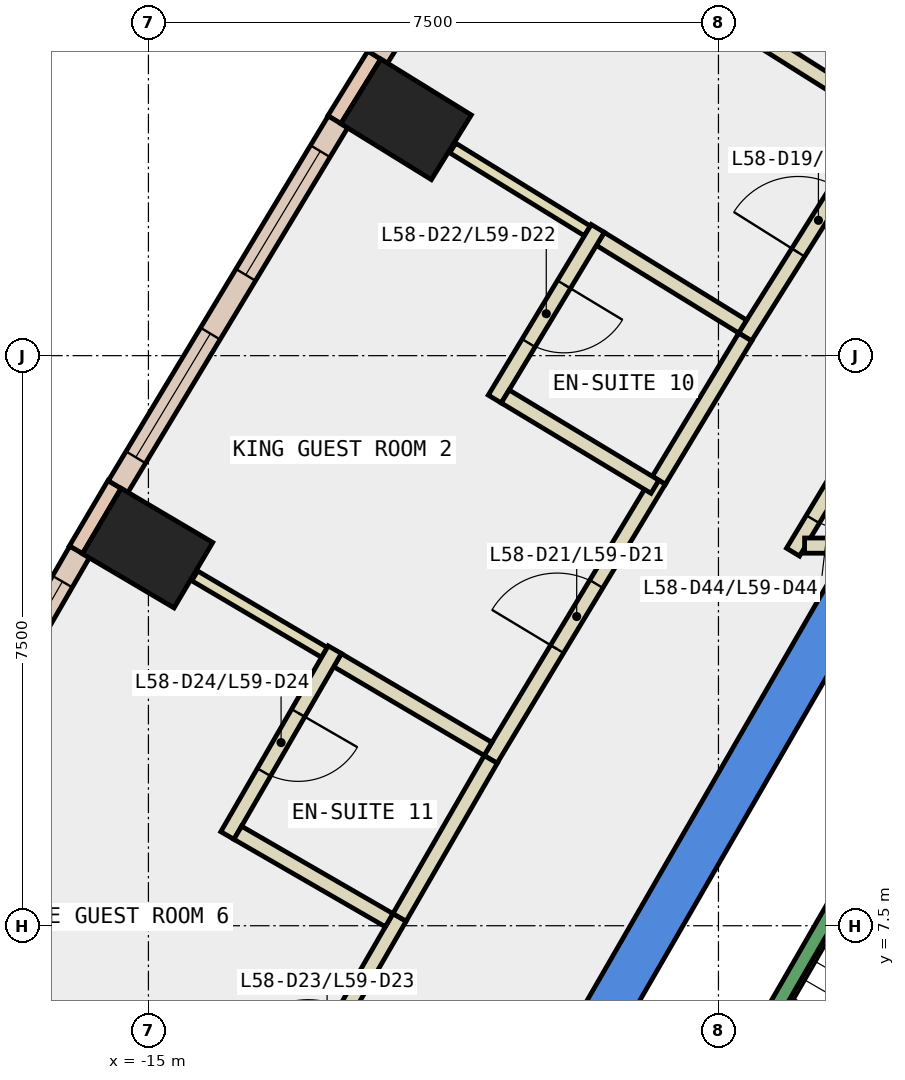
"""IFC4 building model, lengths in metres.
Left out: names, types, materials, properties, quantities, classifications, styles, units other than length and angle.
Written with IfcOpenShell. Run it as: python <this file> out.ifc"""

import sys

from ifc_helpers import new_model, si_unit, direction, frame, frame_2d, origin, origin_2d, place, context, subcontext, project, spatial, polyline, rectangle, outline, extrude, element, fill, save


model = new_model("IFC4")
c1 = context("Model", 3, precision=1e-05, world=origin(), true_north=direction((0.0, 1.0)))
c2 = subcontext(c1, "Body", "Model", "MODEL_VIEW")
j1 = project(units=[si_unit("LENGTHUNIT", "METRE"), si_unit("PLANEANGLEUNIT", "RADIAN")], contexts=[c1])
p1 = place(None, origin())
s1 = spatial("IfcSite", under=j1, at=p1, CompositionType="ELEMENT")
p2 = place(p1, origin())
s2 = spatial("IfcBuilding", under=s1, at=p2, CompositionType="ELEMENT")
p3 = place(p2, frame((0.0, 0.0, 255.8)))
s3 = spatial("IfcBuildingStorey", under=s2, at=p3, CompositionType="ELEMENT", Elevation=255.8)
for number, where, z_axis, x_axis in (
    (1, (-11.61, 18.109, -0.34), (0.0, 0.0, 1.0), (0.526, 0.851, 0.0)),
    (2, (-15.011, 12.468, -0.34), (0.0, 0.0, 1.0), (0.509, 0.861, 0.0)),
):
    element("IfcColumn", number, at=place(p3, frame(where, z_axis=z_axis, x_axis=x_axis)), inside=s3, PredefinedType="COLUMN", context=c2, shape_type="SweptSolid", body=[
        extrude(rectangle(XDim=1.0, YDim=1.4, at=origin_2d()), origin(), (0.0, 0.0, 1.0), 3.6),
    ])
p4 = place(p3, frame((0.0, 0.0, -0.34)))
e3 = element("IfcWall", 3, at=p4, inside=s3, PredefinedType="SHEAR", context=c2, shape_type="SweptSolid", body=[
    extrude(outline(polyline([(-10.535, 4.253), (-10.015, 3.953), (-5.427, 11.9), (-5.774, 12.5), (-10.535, 4.253)])), origin(), (0.0, 0.0, 1.0), 3.6),
])
p5 = place(p3, frame((-12.028, 18.955, 0.0), z_axis=(0.0, 0.0, 1.0), x_axis=(-0.525648735675, -0.850701714282, 0.0)))
e4 = element("IfcWall", 4, at=p5, inside=s3, PredefinedType="STANDARD", context=c2, shape_type="SweptSolid", body=[
    extrude(rectangle(XDim=1.0, YDim=0.2, at=frame_2d((0.5, 0.0))), origin(), (0.0, 0.0, 1.0), 3.26),
])
p6 = place(p3, frame((-15.446, 13.306, 0.0), z_axis=(0.0, 0.0, 1.0), x_axis=(-0.508268432768, -0.861198699634, 0.0)))
e5 = element("IfcWall", 5, at=p6, inside=s3, PredefinedType="STANDARD", context=c2, shape_type="SweptSolid", body=[
    extrude(rectangle(XDim=1.0, YDim=0.2, at=frame_2d((0.5, 0.0))), origin(), (0.0, 0.0, 1.0), 3.26),
])
p7 = place(p3, frame((-8.981, 23.697, 0.0), z_axis=(0.0, 0.0, 1.0), x_axis=(-0.532558226688, -0.846393369059, 0.0)))
e6 = element("IfcWall", 6, at=p7, inside=s3, PredefinedType="STANDARD", context=c2, shape_type="SweptSolid", body=[
    extrude(rectangle(XDim=5.637, YDim=0.3, at=frame_2d((2.818, 0.0))), origin(), (0.0, 0.0, 1.0), 3.26),
])
p8 = place(p7, frame((0.459, 0.0, 0.9)))
e7 = element("IfcOpeningElement", 7, at=p8, cuts=e6, PredefinedType="OPENING", context=c2, shape_type="SweptSolid", body=[
    extrude(rectangle(XDim=1.9, YDim=2.0, at=frame_2d((0.95, 1.0))), frame((0.0, 0.16, 0.0), z_axis=(0.0, -1.0, 0.0), x_axis=(1.0, 0.0, 0.0)), (0.0, 0.0, 1.0), 0.32),
])
p9 = place(p7, frame((3.278, 0.0, 0.9)))
e8 = element("IfcOpeningElement", 8, at=p9, cuts=e6, PredefinedType="OPENING", context=c2, shape_type="SweptSolid", body=[
    extrude(rectangle(XDim=1.9, YDim=2.0, at=frame_2d((0.95, 1.0))), frame((0.0, 0.16, 0.0), z_axis=(0.0, -1.0, 0.0), x_axis=(1.0, 0.0, 0.0)), (0.0, 0.0, 1.0), 0.32),
])
p10 = place(p3, frame((-12.506, 18.076, 0.0), z_axis=(0.0, 0.0, 1.0), x_axis=(-0.516269519619, -0.856426169096, 0.0)))
e9 = element("IfcWall", 9, at=p10, inside=s3, PredefinedType="STANDARD", context=c2, shape_type="SweptSolid", body=[
    extrude(rectangle(XDim=5.603, YDim=0.3, at=frame_2d((2.802, 0.0))), origin(), (0.0, 0.0, 1.0), 3.26),
])
p11 = place(p10, frame((0.451, 0.0, 0.9)))
e10 = element("IfcOpeningElement", 10, at=p11, cuts=e9, PredefinedType="OPENING", context=c2, shape_type="SweptSolid", body=[
    extrude(rectangle(XDim=1.9, YDim=2.0, at=frame_2d((0.95, 1.0))), frame((0.0, 0.16, 0.0), z_axis=(0.0, -1.0, 0.0), x_axis=(1.0, 0.0, 0.0)), (0.0, 0.0, 1.0), 0.32),
])
p12 = place(p10, frame((3.253, 0.0, 0.9)))
e11 = element("IfcOpeningElement", 11, at=p12, cuts=e9, PredefinedType="OPENING", context=c2, shape_type="SweptSolid", body=[
    extrude(rectangle(XDim=1.9, YDim=2.0, at=frame_2d((0.95, 1.0))), frame((0.0, 0.16, 0.0), z_axis=(0.0, -1.0, 0.0), x_axis=(1.0, 0.0, 0.0)), (0.0, 0.0, 1.0), 0.32),
])
p13 = place(p3, frame((-15.906, 12.418, 0.0), z_axis=(0.0, 0.0, 1.0), x_axis=(-0.500089564757, -0.865973687372, 0.0)))
e12 = element("IfcWall", 12, at=p13, inside=s3, PredefinedType="STANDARD", context=c2, shape_type="SweptSolid", body=[
    extrude(rectangle(XDim=5.603, YDim=0.3, at=frame_2d((2.802, 0.0))), origin(), (0.0, 0.0, 1.0), 3.26),
])
p14 = place(p13, frame((0.451, 0.0, 0.9)))
e13 = element("IfcOpeningElement", 13, at=p14, cuts=e12, PredefinedType="OPENING", context=c2, shape_type="SweptSolid", body=[
    extrude(rectangle(XDim=1.9, YDim=2.0, at=frame_2d((0.95, 1.0))), frame((0.0, 0.16, 0.0), z_axis=(0.0, -1.0, 0.0), x_axis=(1.0, 0.0, 0.0)), (0.0, 0.0, 1.0), 0.32),
])
p15 = place(p13, frame((3.252, 0.0, 0.9)))
e14 = element("IfcOpeningElement", 14, at=p15, cuts=e12, PredefinedType="OPENING", context=c2, shape_type="SweptSolid", body=[
    extrude(rectangle(XDim=1.9, YDim=2.0, at=frame_2d((0.95, 1.0))), frame((0.0, 0.16, 0.0), z_axis=(0.0, -1.0, 0.0), x_axis=(1.0, 0.0, 0.0)), (0.0, 0.0, 1.0), 0.32),
])
p16 = place(p3, frame((-5.482, 14.136, 0.0), z_axis=(0.0, 0.0, 1.0), x_axis=(-0.516156559549, -0.856494253357, 0.0)))
e15 = element("IfcWall", 15, at=p16, inside=s3, PredefinedType="PARTITIONING", context=c2, shape_type="SweptSolid", body=[
    extrude(rectangle(XDim=2.009, YDim=0.2, at=frame_2d((1.005, 0.0))), origin(), (0.0, 0.0, 1.0), 3.26),
])
p17 = place(p16, frame((0.504, 0.0, 0.0)))
e16 = element("IfcOpeningElement", 16, at=p17, cuts=e15, PredefinedType="OPENING", context=c2, shape_type="SweptSolid", body=[
    extrude(rectangle(XDim=1.0, YDim=2.1, at=frame_2d((0.5, 1.05))), frame((0.0, 0.11, 0.0), z_axis=(0.0, -1.0, 0.0), x_axis=(1.0, 0.0, 0.0)), (0.0, 0.0, 1.0), 0.22),
])
p18 = place(p3, frame((-6.367, 12.501, 0.0), z_axis=(0.0, 0.0, 1.0), x_axis=(1.0, 0.0, 0.0)))
e17 = element("IfcWall", 17, at=p18, inside=s3, PredefinedType="PARTITIONING", context=c2, shape_type="SweptSolid", body=[
    extrude(rectangle(XDim=0.596, YDim=0.2, at=frame_2d((0.298, 0.0))), origin(), (0.0, 0.0, 1.0), 3.26),
])
p19 = place(p3, frame((-7.15, 15.246, 0.0), z_axis=(0.0, 0.0, 1.0), x_axis=(0.532449518014, 0.846461759778, 0.0)))
e18 = element("IfcWall", 18, at=p19, inside=s3, PredefinedType="PARTITIONING", context=c2, shape_type="SweptSolid", body=[
    extrude(rectangle(XDim=3.525, YDim=0.2, at=frame_2d((1.763, 0.0))), origin(), (0.0, 0.0, 1.0), 3.26),
])
p20 = place(p19, frame((1.313, 0.0, 0.0)))
e19 = element("IfcOpeningElement", 19, at=p20, cuts=e18, PredefinedType="OPENING", context=c2, shape_type="SweptSolid", body=[
    extrude(rectangle(XDim=1.0, YDim=2.1, at=frame_2d((0.5, 1.05))), frame((0.0, 0.11, 0.0), z_axis=(0.0, -1.0, 0.0), x_axis=(1.0, 0.0, 0.0)), (0.0, 0.0, 1.0), 0.22),
])
p21 = place(p3, frame((-10.498, 9.689, 0.0), z_axis=(0.0, 0.0, 1.0), x_axis=(0.516353342298, 0.856375633643, 0.0)))
e20 = element("IfcWall", 20, at=p21, inside=s3, PredefinedType="PARTITIONING", context=c2, shape_type="SweptSolid", body=[
    extrude(rectangle(XDim=4.288, YDim=0.2, at=frame_2d((2.144, 0.0))), origin(), (0.0, 0.0, 1.0), 3.26),
])
p22 = place(p21, frame((1.694, 0.0, 0.0)))
e21 = element("IfcOpeningElement", 21, at=p22, cuts=e20, PredefinedType="OPENING", context=c2, shape_type="SweptSolid", body=[
    extrude(rectangle(XDim=1.0, YDim=2.1, at=frame_2d((0.5, 1.05))), frame((0.0, 0.11, 0.0), z_axis=(0.0, -1.0, 0.0), x_axis=(1.0, 0.0, 0.0)), (0.0, 0.0, 1.0), 0.22),
])
p23 = place(p3, frame((-8.284, 13.361, 0.0), z_axis=(0.0, 0.0, 1.0), x_axis=(0.516354965559, 0.856374654893, 0.0)))
e22 = element("IfcWall", 22, at=p23, inside=s3, PredefinedType="PARTITIONING", context=c2, shape_type="SweptSolid", body=[
    extrude(rectangle(XDim=2.2, YDim=0.2, at=frame_2d((1.1, 0.0))), origin(), (0.0, 0.0, 1.0), 3.26),
])
p24 = place(p3, frame((-13.652, 4.224, 0.0), z_axis=(0.0, 0.0, 1.0), x_axis=(0.500221427001, 0.865897525097, 0.0)))
e23 = element("IfcWall", 23, at=p24, inside=s3, PredefinedType="PARTITIONING", context=c2, shape_type="SweptSolid", body=[
    extrude(rectangle(XDim=3.91, YDim=0.2, at=frame_2d((1.955, 0.0))), origin(), (0.0, 0.0, 1.0), 3.26),
])
p25 = place(p24, frame((1.505, 0.0, 0.0)))
e24 = element("IfcOpeningElement", 24, at=p25, cuts=e23, PredefinedType="OPENING", context=c2, shape_type="SweptSolid", body=[
    extrude(rectangle(XDim=1.0, YDim=2.1, at=frame_2d((0.5, 1.05))), frame((0.0, 0.11, 0.0), z_axis=(0.0, -1.0, 0.0), x_axis=(1.0, 0.0, 0.0)), (0.0, 0.0, 1.0), 0.22),
])
p26 = place(p3, frame((-11.696, 7.61, 0.0), z_axis=(0.0, 0.0, 1.0), x_axis=(0.500089422704, 0.865973769406, 0.0)))
e25 = element("IfcWall", 25, at=p26, inside=s3, PredefinedType="PARTITIONING", context=c2, shape_type="SweptSolid", body=[
    extrude(rectangle(XDim=2.399, YDim=0.2, at=frame_2d((1.2, 0.0))), origin(), (0.0, 0.0, 1.0), 3.26),
])
p27 = place(p3, frame((-7.357, 19.423, 0.0), z_axis=(0.0, 0.0, 1.0), x_axis=(0.846270070045, -0.532754135176, 0.0)))
e26 = element("IfcWall", 26, at=p27, inside=s3, PredefinedType="PARTITIONING", context=c2, shape_type="SweptSolid", body=[
    extrude(rectangle(XDim=2.3, YDim=0.2, at=frame_2d((1.15, 0.0))), origin(), (0.0, 0.0, 1.0), 3.26),
])
p28 = place(p3, frame((-9.225, 16.641, 0.0), z_axis=(0.0, 0.0, 1.0), x_axis=(-0.85144868382, 0.524437926566, 0.0)))
e27 = element("IfcWall", 27, at=p28, inside=s3, PredefinedType="PARTITIONING", context=c2, shape_type="SweptSolid", body=[
    extrude(rectangle(XDim=2.08, YDim=0.15, at=frame_2d((1.04, 0.0))), origin(), (0.0, 0.0, 1.0), 3.26),
])
p29 = place(p3, frame((-7.182, 15.383, 0.0), z_axis=(0.0, 0.0, 1.0), x_axis=(-0.851498142432, 0.524357619792, 0.0)))
e28 = element("IfcWall", 28, at=p29, inside=s3, PredefinedType="PARTITIONING", context=c2, shape_type="SweptSolid", body=[
    extrude(rectangle(XDim=2.198, YDim=0.2, at=frame_2d((1.099, 0.0))), origin(), (0.0, 0.0, 1.0), 3.26),
])
p30 = place(p3, frame((-9.088, 16.674, 0.0), z_axis=(0.0, 0.0, 1.0), x_axis=(-0.516780274192, -0.856118069081, 0.0)))
e29 = element("IfcWall", 29, at=p30, inside=s3, PredefinedType="PARTITIONING", context=c2, shape_type="SweptSolid", body=[
    extrude(rectangle(XDim=2.623, YDim=0.2, at=frame_2d((1.311, 0.0))), origin(), (0.0, 0.0, 1.0), 3.26),
])
p31 = place(p30, frame((0.861, 0.0, 0.0)))
e30 = element("IfcOpeningElement", 30, at=p31, cuts=e29, PredefinedType="OPENING", context=c2, shape_type="SweptSolid", body=[
    extrude(rectangle(XDim=0.9, YDim=2.1, at=frame_2d((0.45, 1.05))), frame((0.0, 0.11, 0.0), z_axis=(0.0, -1.0, 0.0), x_axis=(1.0, 0.0, 0.0)), (0.0, 0.0, 1.0), 0.22),
])
p32 = place(p3, frame((-10.306, 14.463, 0.0), z_axis=(0.0, 0.0, 1.0), x_axis=(0.856338986581, -0.51641411683, 0.0)))
e31 = element("IfcWall", 31, at=p32, inside=s3, PredefinedType="PARTITIONING", context=c2, shape_type="SweptSolid", body=[
    extrude(rectangle(XDim=2.301, YDim=0.2, at=frame_2d((1.15, 0.0))), origin(), (0.0, 0.0, 1.0), 3.26),
])
p33 = place(p3, frame((-12.685, 11.096, 0.0), z_axis=(0.0, 0.0, 1.0), x_axis=(-0.861157054724, 0.508338988371, 0.0)))
e32 = element("IfcWall", 32, at=p33, inside=s3, PredefinedType="PARTITIONING", context=c2, shape_type="SweptSolid", body=[
    extrude(rectangle(XDim=1.981, YDim=0.15, at=frame_2d((0.991, 0.0))), origin(), (0.0, 0.0, 1.0), 3.26),
])
p34 = place(p3, frame((-10.532, 9.826, 0.0), z_axis=(0.0, 0.0, 1.0), x_axis=(-0.861311086958, 0.508077958077, 0.0)))
e33 = element("IfcWall", 33, at=p34, inside=s3, PredefinedType="PARTITIONING", context=c2, shape_type="SweptSolid", body=[
    extrude(rectangle(XDim=2.299, YDim=0.2, at=frame_2d((1.149, 0.0))), origin(), (0.0, 0.0, 1.0), 3.26),
])
p35 = place(p3, frame((-12.548, 11.132, 0.0), z_axis=(0.0, 0.0, 1.0), x_axis=(-0.500313606915, -0.865844267022, 0.0)))
e34 = element("IfcWall", 34, at=p35, inside=s3, PredefinedType="PARTITIONING", context=c2, shape_type="SweptSolid", body=[
    extrude(rectangle(XDim=2.824, YDim=0.2, at=frame_2d((1.412, 0.0))), origin(), (0.0, 0.0, 1.0), 3.26),
])
p36 = place(p35, frame((0.962, 0.0, 0.0)))
e35 = element("IfcOpeningElement", 35, at=p36, cuts=e34, PredefinedType="OPENING", context=c2, shape_type="SweptSolid", body=[
    extrude(rectangle(XDim=0.9, YDim=2.1, at=frame_2d((0.45, 1.05))), frame((0.0, 0.11, 0.0), z_axis=(0.0, -1.0, 0.0), x_axis=(1.0, 0.0, 0.0)), (0.0, 0.0, 1.0), 0.22),
])
p37 = place(p3, frame((-13.825, 8.723, 0.0), z_axis=(0.0, 0.0, 1.0), x_axis=(0.866053019151, -0.499952165731, 0.0)))
e36 = element("IfcWall", 36, at=p37, inside=s3, PredefinedType="PARTITIONING", context=c2, shape_type="SweptSolid", body=[
    extrude(rectangle(XDim=2.3, YDim=0.2, at=frame_2d((1.15, 0.0))), origin(), (0.0, 0.0, 1.0), 3.26),
])
p38 = place(p3, frame((-5.03, 9.388, 0.0), z_axis=(0.0, 0.0, 1.0), x_axis=(-0.499978703459, -0.866037698999, 0.0)))
e37 = element("IfcWall", 37, at=p38, inside=s3, PredefinedType="STANDARD", context=c2, shape_type="SweptSolid", body=[
    extrude(rectangle(XDim=6.9, YDim=0.2, at=frame_2d((3.45, 0.0))), origin(), (0.0, 0.0, 1.0), 3.26),
])
p39 = place(p11, origin())
e38 = element("IfcWindow", 38, at=p39, inside=s3, PartitioningType="SINGLE_PANEL", PredefinedType="WINDOW", context=c2, shape_type="SweptSolid", body=[
    extrude(rectangle(XDim=1.9, YDim=2.0, at=frame_2d((0.95, 1.0))), frame((0.0, 0.03, 0.0), z_axis=(0.0, -1.0, 0.0), x_axis=(1.0, 0.0, 0.0)), (0.0, 0.0, 1.0), 0.06),
])
fill(e10, e38)
p40 = place(p12, origin())
e39 = element("IfcWindow", 39, at=p40, inside=s3, PartitioningType="SINGLE_PANEL", PredefinedType="WINDOW", context=c2, shape_type="SweptSolid", body=[
    extrude(rectangle(XDim=1.9, YDim=2.0, at=frame_2d((0.95, 1.0))), frame((0.0, 0.03, 0.0), z_axis=(0.0, -1.0, 0.0), x_axis=(1.0, 0.0, 0.0)), (0.0, 0.0, 1.0), 0.06),
])
fill(e11, e39)
p41 = place(p14, origin())
e40 = element("IfcWindow", 40, at=p41, inside=s3, PartitioningType="SINGLE_PANEL", PredefinedType="WINDOW", context=c2, shape_type="SweptSolid", body=[
    extrude(rectangle(XDim=1.9, YDim=2.0, at=frame_2d((0.95, 1.0))), frame((0.0, 0.03, 0.0), z_axis=(0.0, -1.0, 0.0), x_axis=(1.0, 0.0, 0.0)), (0.0, 0.0, 1.0), 0.06),
])
fill(e13, e40)
p42 = place(p20, origin())
e41 = element("IfcDoor", 41, at=p42, inside=s3, OperationType="SINGLE_SWING_RIGHT", PredefinedType="DOOR", context=c2, shape_type="SweptSolid", body=[
    extrude(rectangle(XDim=1.0, YDim=2.1, at=frame_2d((0.5, 1.05))), frame((0.0, 0.025, 0.0), z_axis=(0.0, -1.0, 0.0), x_axis=(1.0, 0.0, 0.0)), (0.0, 0.0, 1.0), 0.05),
])
fill(e19, e41)
p43 = place(p22, origin())
e42 = element("IfcDoor", 42, at=p43, inside=s3, OperationType="SINGLE_SWING_RIGHT", PredefinedType="DOOR", context=c2, shape_type="SweptSolid", body=[
    extrude(rectangle(XDim=1.0, YDim=2.1, at=frame_2d((0.5, 1.05))), frame((0.0, 0.025, 0.0), z_axis=(0.0, -1.0, 0.0), x_axis=(1.0, 0.0, 0.0)), (0.0, 0.0, 1.0), 0.05),
])
fill(e21, e42)
p44 = place(p31, origin())
e43 = element("IfcDoor", 43, at=p44, inside=s3, OperationType="SINGLE_SWING_LEFT", PredefinedType="DOOR", context=c2, shape_type="SweptSolid", body=[
    extrude(rectangle(XDim=0.9, YDim=2.1, at=frame_2d((0.45, 1.05))), frame((0.0, 0.025, 0.0), z_axis=(0.0, -1.0, 0.0), x_axis=(1.0, 0.0, 0.0)), (0.0, 0.0, 1.0), 0.05),
])
fill(e30, e43)
p45 = place(p36, origin())
e44 = element("IfcDoor", 44, at=p45, inside=s3, OperationType="SINGLE_SWING_LEFT", PredefinedType="DOOR", context=c2, shape_type="SweptSolid", body=[
    extrude(rectangle(XDim=0.9, YDim=2.1, at=frame_2d((0.45, 1.05))), frame((0.0, 0.025, 0.0), z_axis=(0.0, -1.0, 0.0), x_axis=(1.0, 0.0, 0.0)), (0.0, 0.0, 1.0), 0.05),
])
fill(e35, e44)
p46 = place(p17, origin())
e45 = element("IfcDoor", 45, at=p46, inside=s3, OperationType="SINGLE_SWING_LEFT", PredefinedType="DOOR", context=c2, shape_type="SweptSolid", body=[
    extrude(rectangle(XDim=1.0, YDim=2.1, at=frame_2d((0.5, 1.05))), frame((0.0, 0.025, 0.0), z_axis=(0.0, -1.0, 0.0), x_axis=(1.0, 0.0, 0.0)), (0.0, 0.0, 1.0), 0.05),
])
fill(e16, e45)
save(model, sys.argv[1])
